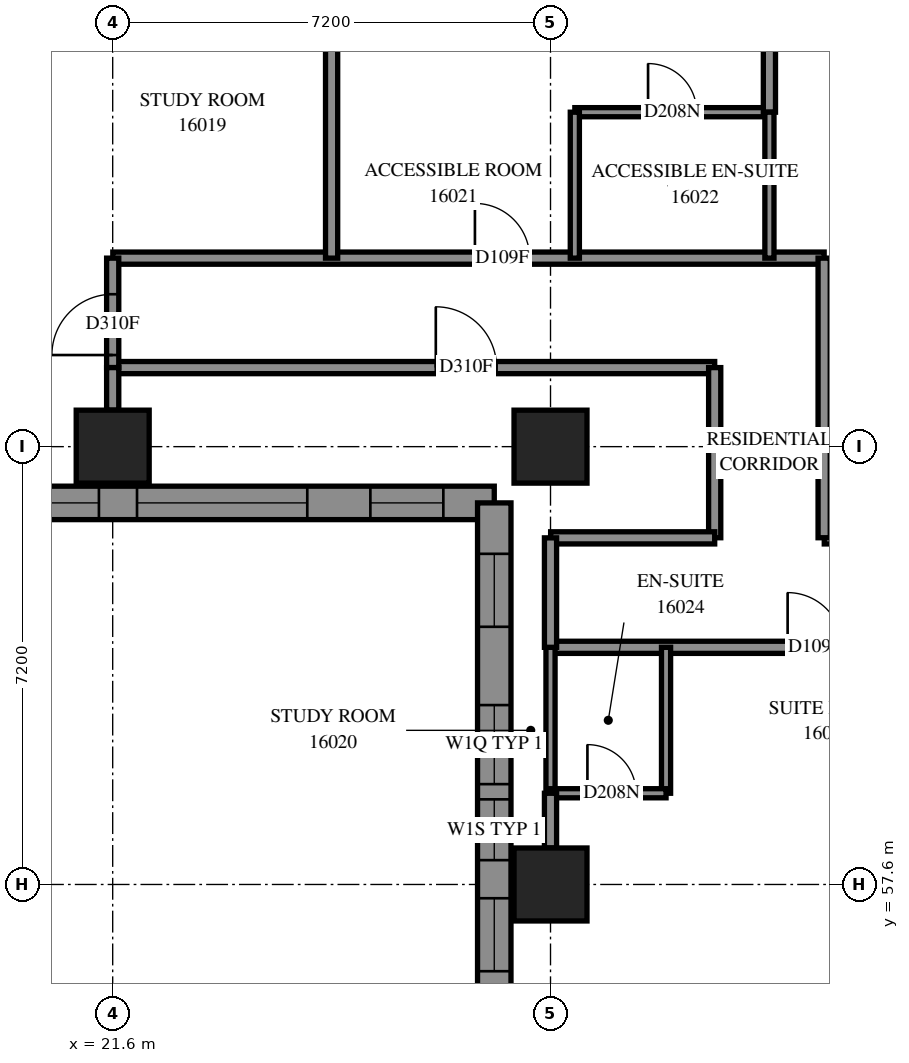
"""IFC4 building model, lengths in metres.
Left out: names, types, materials, properties, quantities, classifications, styles, units other than length and angle.
Written with IfcOpenShell. Run it as: python <this file> out.ifc"""

import sys

from ifc_helpers import new_model, si_unit, direction, frame, frame_2d, origin, origin_2d, place, context, subcontext, project, spatial, polyline, rectangle, outline, extrude, element, fill, save


model = new_model("IFC4")
c1 = context("Model", 3, precision=1e-05, world=origin(), true_north=direction((0.0, 1.0)))
c2 = subcontext(c1, "Body", "Model", "MODEL_VIEW")
j1 = project(units=[si_unit("LENGTHUNIT", "METRE"), si_unit("PLANEANGLEUNIT", "RADIAN")], contexts=[c1])
p1 = place(None, origin())
s1 = spatial("IfcSite", under=j1, at=p1, CompositionType="ELEMENT")
p2 = place(p1, origin())
s2 = spatial("IfcBuilding", under=s1, at=p2, CompositionType="ELEMENT")
p3 = place(p2, frame((0.0, 0.0, 61.0)))
s3 = spatial("IfcBuildingStorey", under=s2, at=p3, CompositionType="ELEMENT", Elevation=61.0)
for number, where, z_axis, x_axis in (
    (1, (21.6, 64.8, 0.0), (0.0, 0.0, 1.0), (1.0, 0.0, 0.0)),
    (2, (28.8, 57.6, 0.0), (0.0, 0.0, 1.0), (1.0, 0.0, 0.0)),
    (3, (28.8, 64.8, 0.0), (0.0, 0.0, 1.0), (1.0, 0.0, 0.0)),
):
    element("IfcColumn", number, at=place(p3, frame(where, z_axis=z_axis, x_axis=x_axis)), inside=s3, PredefinedType="COLUMN", context=c2, shape_type="SweptSolid", body=[
        extrude(rectangle(XDim=1.2, YDim=1.2, at=origin_2d()), origin(), (0.0, 0.0, 1.0), 3.1),
    ])
p4 = place(p3, frame((19.472, 63.875, 0.0), z_axis=(0.0, 0.0, 1.0), x_axis=(1.0, 0.0, 0.0)))
e4 = element("IfcWall", 4, at=p4, inside=s3, PredefinedType="SOLIDWALL", context=c2, shape_type="SweptSolid", body=[
    extrude(outline(polyline([(-0.275, -0.275), (8.128, -0.275), (8.678, 0.275), (0.275, 0.275), (-0.275, -0.275)])), origin(), (0.0, 0.0, 1.0), 3.1),
])
p5 = place(p4, frame((2.528, 0.0, 0.5)))
e5 = element("IfcOpeningElement", 5, at=p5, cuts=e4, PredefinedType="OPENING", context=c2, shape_type="SweptSolid", body=[
    extrude(rectangle(XDim=2.8, YDim=2.45, at=frame_2d((1.4, 1.225))), frame((0.0, 0.285, 0.0), z_axis=(0.0, -1.0, 0.0), x_axis=(1.0, 0.0, 0.0)), (0.0, 0.0, 1.0), 0.57),
])
p6 = place(p4, frame((0.702, 0.0, 0.5)))
e6 = element("IfcOpeningElement", 6, at=p6, cuts=e4, PredefinedType="OPENING", context=c2, shape_type="SweptSolid", body=[
    extrude(rectangle(XDim=1.2, YDim=2.45, at=frame_2d((0.6, 1.225))), frame((0.0, 0.285, 0.0), z_axis=(0.0, -1.0, 0.0), x_axis=(1.0, 0.0, 0.0)), (0.0, 0.0, 1.0), 0.57),
])
p7 = place(p4, frame((6.365, 0.0, 0.5)))
e7 = element("IfcOpeningElement", 7, at=p7, cuts=e4, PredefinedType="OPENING", context=c2, shape_type="SweptSolid", body=[
    extrude(rectangle(XDim=1.2, YDim=2.45, at=frame_2d((0.6, 1.225))), frame((0.0, 0.285, 0.0), z_axis=(0.0, -1.0, 0.0), x_axis=(1.0, 0.0, 0.0)), (0.0, 0.0, 1.0), 0.57),
])
p8 = place(p3, frame((27.875, 63.875, 0.0), z_axis=(0.0, 0.0, 1.0), x_axis=(0.0, -1.0, 0.0)))
e8 = element("IfcWall", 8, at=p8, inside=s3, PredefinedType="SOLIDWALL", context=c2, shape_type="SweptSolid", body=[
    extrude(outline(polyline([(0.275, -0.275), (8.678, -0.275), (8.128, 0.275), (-0.275, 0.275), (0.275, -0.275)])), origin(), (0.0, 0.0, 1.0), 3.1),
])
p9 = place(p8, frame((0.838, 0.0, 0.5)))
e9 = element("IfcOpeningElement", 9, at=p9, cuts=e8, PredefinedType="OPENING", context=c2, shape_type="SweptSolid", body=[
    extrude(rectangle(XDim=1.2, YDim=2.45, at=frame_2d((0.6, 1.225))), frame((0.0, 0.285, 0.0), z_axis=(0.0, -1.0, 0.0), x_axis=(1.0, 0.0, 0.0)), (0.0, 0.0, 1.0), 0.57),
])
p10 = place(p8, frame((6.502, 0.0, 0.5)))
e10 = element("IfcOpeningElement", 10, at=p10, cuts=e8, PredefinedType="OPENING", context=c2, shape_type="SweptSolid", body=[
    extrude(rectangle(XDim=1.2, YDim=2.45, at=frame_2d((0.6, 1.225))), frame((0.0, 0.285, 0.0), z_axis=(0.0, -1.0, 0.0), x_axis=(1.0, 0.0, 0.0)), (0.0, 0.0, 1.0), 0.57),
])
p11 = place(p8, frame((3.325, 0.0, 0.45)))
e11 = element("IfcOpeningElement", 11, at=p11, cuts=e8, PredefinedType="OPENING", context=c2, shape_type="SweptSolid", body=[
    extrude(rectangle(XDim=1.3, YDim=2.5, at=frame_2d((0.65, 1.25))), frame((0.0, 0.285, 0.0), z_axis=(0.0, -1.0, 0.0), x_axis=(1.0, 0.0, 0.0)), (0.0, 0.0, 1.0), 0.57),
])
p12 = place(p8, frame((4.875, 0.0, 0.45)))
e12 = element("IfcOpeningElement", 12, at=p12, cuts=e8, PredefinedType="OPENING", context=c2, shape_type="SweptSolid", body=[
    extrude(rectangle(XDim=1.0, YDim=2.5, at=frame_2d((0.5, 1.25))), frame((0.0, 0.285, 0.0), z_axis=(0.0, -1.0, 0.0), x_axis=(1.0, 0.0, 0.0)), (0.0, 0.0, 1.0), 0.57),
])
p13 = place(p3, frame((28.8, 61.5, 0.0), z_axis=(0.0, 0.0, 1.0), x_axis=(1.0, 0.0, 0.0)))
e13 = element("IfcWall", 13, at=p13, inside=s3, PredefinedType="PARTITIONING", context=c2, shape_type="SweptSolid", body=[
    extrude(rectangle(XDim=24.3, YDim=0.2, at=frame_2d((12.15, 0.0))), origin(), (0.0, 0.0, 1.0), 3.1),
])
p14 = place(p13, frame((3.899, 0.0, 0.0)))
e14 = element("IfcOpeningElement", 14, at=p14, cuts=e13, PredefinedType="OPENING", context=c2, shape_type="SweptSolid", body=[
    extrude(rectangle(XDim=0.9, YDim=2.1, at=frame_2d((0.45, 1.05))), frame((0.0, 0.11, 0.0), z_axis=(0.0, -1.0, 0.0), x_axis=(1.0, 0.0, 0.0)), (0.0, 0.0, 1.0), 0.22),
])
p15 = place(p13, frame((9.5, 0.0, 0.0)))
e15 = element("IfcOpeningElement", 15, at=p15, cuts=e13, PredefinedType="OPENING", context=c2, shape_type="SweptSolid", body=[
    extrude(rectangle(XDim=0.9, YDim=2.1, at=frame_2d((0.45, 1.05))), frame((0.0, 0.11, 0.0), z_axis=(0.0, -1.0, 0.0), x_axis=(1.0, 0.0, 0.0)), (0.0, 0.0, 1.0), 0.22),
])
p16 = place(p13, frame((11.307, 0.0, 0.0)))
e16 = element("IfcOpeningElement", 16, at=p16, cuts=e13, PredefinedType="OPENING", context=c2, shape_type="SweptSolid", body=[
    extrude(rectangle(XDim=1.0, YDim=2.1, at=frame_2d((0.5, 1.05))), frame((0.0, 0.11, 0.0), z_axis=(0.0, -1.0, 0.0), x_axis=(1.0, 0.0, 0.0)), (0.0, 0.0, 1.0), 0.22),
])
p17 = place(p13, frame((16.7, 0.0, 0.0)))
e17 = element("IfcOpeningElement", 17, at=p17, cuts=e13, PredefinedType="OPENING", context=c2, shape_type="SweptSolid", body=[
    extrude(rectangle(XDim=0.9, YDim=2.1, at=frame_2d((0.45, 1.05))), frame((0.0, 0.11, 0.0), z_axis=(0.0, -1.0, 0.0), x_axis=(1.0, 0.0, 0.0)), (0.0, 0.0, 1.0), 0.22),
])
p18 = place(p13, frame((18.508, 0.0, 0.0)))
e18 = element("IfcOpeningElement", 18, at=p18, cuts=e13, PredefinedType="OPENING", context=c2, shape_type="SweptSolid", body=[
    extrude(rectangle(XDim=1.0, YDim=2.1, at=frame_2d((0.5, 1.05))), frame((0.0, 0.11, 0.0), z_axis=(0.0, -1.0, 0.0), x_axis=(1.0, 0.0, 0.0)), (0.0, 0.0, 1.0), 0.22),
])
p19 = place(p13, frame((23.033, 0.0, 0.0)))
e19 = element("IfcOpeningElement", 19, at=p19, cuts=e13, PredefinedType="OPENING", context=c2, shape_type="SweptSolid", body=[
    extrude(rectangle(XDim=1.0, YDim=2.1, at=frame_2d((0.5, 1.05))), frame((0.0, 0.11, 0.0), z_axis=(0.0, -1.0, 0.0), x_axis=(1.0, 0.0, 0.0)), (0.0, 0.0, 1.0), 0.22),
])
p20 = place(p3, frame((33.302, 63.3, 0.0), z_axis=(0.0, 0.0, 1.0), x_axis=(1.0, 0.0, 0.0)))
e20 = element("IfcWall", 20, at=p20, inside=s3, PredefinedType="PARTITIONING", context=c2, shape_type="SweptSolid", body=[
    extrude(rectangle(XDim=21.798, YDim=0.2, at=frame_2d((10.899, 0.0))), origin(), (0.0, 0.0, 1.0), 3.1),
])
p21 = place(p20, frame((1.091, 0.0, 0.0)))
e21 = element("IfcOpeningElement", 21, at=p21, cuts=e20, PredefinedType="OPENING", context=c2, shape_type="SweptSolid", body=[
    extrude(rectangle(XDim=0.9, YDim=2.1, at=frame_2d((0.45, 1.05))), frame((0.0, 0.11, 0.0), z_axis=(0.0, -1.0, 0.0), x_axis=(1.0, 0.0, 0.0)), (0.0, 0.0, 1.0), 0.22),
])
p22 = place(p20, frame((8.248, 0.0, 0.0)))
e22 = element("IfcOpeningElement", 22, at=p22, cuts=e20, PredefinedType="OPENING", context=c2, shape_type="SweptSolid", body=[
    extrude(rectangle(XDim=0.9, YDim=2.1, at=frame_2d((0.45, 1.05))), frame((0.0, 0.11, 0.0), z_axis=(0.0, -1.0, 0.0), x_axis=(1.0, 0.0, 0.0)), (0.0, 0.0, 1.0), 0.22),
])
p23 = place(p20, frame((15.448, 0.0, 0.0)))
e23 = element("IfcOpeningElement", 23, at=p23, cuts=e20, PredefinedType="OPENING", context=c2, shape_type="SweptSolid", body=[
    extrude(rectangle(XDim=0.9, YDim=2.1, at=frame_2d((0.45, 1.05))), frame((0.0, 0.11, 0.0), z_axis=(0.0, -1.0, 0.0), x_axis=(1.0, 0.0, 0.0)), (0.0, 0.0, 1.0), 0.22),
])
p24 = place(p3, frame((21.602, 67.9, 0.0), z_axis=(0.0, 0.0, 1.0), x_axis=(1.0, 0.0, 0.0)))
e24 = element("IfcWall", 24, at=p24, inside=s3, PredefinedType="PARTITIONING", context=c2, shape_type="SweptSolid", body=[
    extrude(rectangle(XDim=11.698, YDim=0.2, at=frame_2d((5.849, 0.0))), origin(), (0.0, 0.0, 1.0), 3.1),
])
p25 = place(p24, frame((5.955, 0.0, 0.0)))
e25 = element("IfcOpeningElement", 25, at=p25, cuts=e24, PredefinedType="OPENING", context=c2, shape_type="SweptSolid", body=[
    extrude(rectangle(XDim=0.9, YDim=2.1, at=frame_2d((0.45, 1.05))), frame((0.0, 0.11, 0.0), z_axis=(0.0, -1.0, 0.0), x_axis=(1.0, 0.0, 0.0)), (0.0, 0.0, 1.0), 0.22),
])
p26 = place(p3, frame((21.6, 66.1, 0.0), z_axis=(0.0, 0.0, 1.0), x_axis=(1.0, 0.0, 0.0)))
e26 = element("IfcWall", 26, at=p26, inside=s3, PredefinedType="PARTITIONING", context=c2, shape_type="SweptSolid", body=[
    extrude(rectangle(XDim=9.9, YDim=0.2, at=frame_2d((4.95, 0.0))), origin(), (0.0, 0.0, 1.0), 3.1),
])
p27 = place(p26, frame((5.314, 0.0, 0.0)))
e27 = element("IfcOpeningElement", 27, at=p27, cuts=e26, PredefinedType="OPENING", context=c2, shape_type="SweptSolid", body=[
    extrude(rectangle(XDim=1.0, YDim=2.1, at=frame_2d((0.5, 1.05))), frame((0.0, 0.11, 0.0), z_axis=(0.0, -1.0, 0.0), x_axis=(1.0, 0.0, 0.0)), (0.0, 0.0, 1.0), 0.22),
])
p28 = place(p3, frame((25.2, 67.9, 0.0), z_axis=(0.0, 0.0, 1.0), x_axis=(0.0, 1.0, 0.0)))
e28 = element("IfcWall", 28, at=p28, inside=s3, PredefinedType="PARTITIONING", context=c2, shape_type="SweptSolid", body=[
    extrude(rectangle(XDim=5.09, YDim=0.2, at=frame_2d((2.545, 0.0))), origin(), (0.0, 0.0, 1.0), 3.1),
])
p29 = place(p3, frame((33.3, 63.302, 0.0), z_axis=(0.0, 0.0, 1.0), x_axis=(0.0, 1.0, 0.0)))
e29 = element("IfcWall", 29, at=p29, inside=s3, PredefinedType="PARTITIONING", context=c2, shape_type="SweptSolid", body=[
    extrude(rectangle(XDim=4.598, YDim=0.2, at=frame_2d((2.299, 0.0))), origin(), (0.0, 0.0, 1.0), 3.1),
])
p30 = place(p3, frame((29.2, 70.3, 0.0), z_axis=(0.0, 0.0, 1.0), x_axis=(1.0, 0.0, 0.0)))
e30 = element("IfcWall", 30, at=p30, inside=s3, PredefinedType="PARTITIONING", context=c2, shape_type="SweptSolid", body=[
    extrude(rectangle(XDim=3.2, YDim=0.15, at=frame_2d((1.6, 0.0))), origin(), (0.0, 0.0, 1.0), 3.1),
])
p31 = place(p30, frame((1.204, 0.0, 0.0)))
e31 = element("IfcOpeningElement", 31, at=p31, cuts=e30, PredefinedType="OPENING", context=c2, shape_type="SweptSolid", body=[
    extrude(rectangle(XDim=0.8, YDim=2.1, at=frame_2d((0.4, 1.05))), frame((0.0, 0.085, 0.0), z_axis=(0.0, -1.0, 0.0), x_axis=(1.0, 0.0, 0.0)), (0.0, 0.0, 1.0), 0.17),
])
p32 = place(p3, frame((31.5, 63.302, 0.0), z_axis=(0.0, 0.0, 1.0), x_axis=(0.0, 1.0, 0.0)))
e32 = element("IfcWall", 32, at=p32, inside=s3, PredefinedType="PARTITIONING", context=c2, shape_type="SweptSolid", body=[
    extrude(rectangle(XDim=2.798, YDim=0.2, at=frame_2d((1.399, 0.0))), origin(), (0.0, 0.0, 1.0), 3.1),
])
p33 = place(p3, frame((28.802, 63.3, 0.0), z_axis=(0.0, 0.0, 1.0), x_axis=(1.0, 0.0, 0.0)))
e33 = element("IfcWall", 33, at=p33, inside=s3, PredefinedType="PARTITIONING", context=c2, shape_type="SweptSolid", body=[
    extrude(rectangle(XDim=2.698, YDim=0.2, at=frame_2d((1.349, 0.0))), origin(), (0.0, 0.0, 1.0), 3.1),
])
p34 = place(p3, frame((32.4, 70.3, 0.0), z_axis=(0.0, 0.0, 1.0), x_axis=(0.0, 1.0, 0.0)))
e34 = element("IfcWall", 34, at=p34, inside=s3, PredefinedType="PARTITIONING", context=c2, shape_type="SweptSolid", body=[
    extrude(rectangle(XDim=2.623, YDim=0.2, at=frame_2d((1.311, 0.0))), origin(), (0.0, 0.0, 1.0), 3.1),
])
p35 = place(p3, frame((30.7, 59.1, 0.0), z_axis=(0.0, 0.0, 1.0), x_axis=(0.0, 1.0, 0.0)))
e35 = element("IfcWall", 35, at=p35, inside=s3, PredefinedType="PARTITIONING", context=c2, shape_type="SweptSolid", body=[
    extrude(rectangle(XDim=2.4, YDim=0.15, at=frame_2d((1.2, 0.0))), origin(), (0.0, 0.0, 1.0), 3.1),
])
p36 = place(p3, frame((28.8, 59.1, 0.0), z_axis=(0.0, 0.0, 1.0), x_axis=(0.0, 1.0, 0.0)))
e36 = element("IfcWall", 36, at=p36, inside=s3, PredefinedType="PARTITIONING", context=c2, shape_type="SweptSolid", body=[
    extrude(rectangle(XDim=2.4, YDim=0.15, at=frame_2d((1.2, 0.0))), origin(), (0.0, 0.0, 1.0), 2.6),
])
for number, where, z_axis, x_axis in (
    (37, (29.2, 67.9, 0.0), (0.0, 0.0, 1.0), (0.0, 1.0, 0.0)),
    (38, (32.4, 67.9, 0.0), (0.0, 0.0, 1.0), (0.0, 1.0, 0.0)),
):
    element("IfcWall", number, at=place(p3, frame(where, z_axis=z_axis, x_axis=x_axis)), inside=s3, PredefinedType="PARTITIONING", context=c2, shape_type="SweptSolid", body=[
        extrude(rectangle(XDim=2.4, YDim=0.15, at=frame_2d((1.2, 0.0))), origin(), (0.0, 0.0, 1.0), 3.1),
    ])
p37 = place(p3, frame((28.8, 59.1, 0.0), z_axis=(0.0, 0.0, 1.0), x_axis=(1.0, 0.0, 0.0)))
e39 = element("IfcWall", 39, at=p37, inside=s3, PredefinedType="PARTITIONING", context=c2, shape_type="SweptSolid", body=[
    extrude(rectangle(XDim=1.9, YDim=0.15, at=frame_2d((0.95, 0.0))), origin(), (0.0, 0.0, 1.0), 3.1),
])
p38 = place(p37, frame((0.607, 0.0, 0.0)))
e40 = element("IfcOpeningElement", 40, at=p38, cuts=e39, PredefinedType="OPENING", context=c2, shape_type="SweptSolid", body=[
    extrude(rectangle(XDim=0.8, YDim=2.1, at=frame_2d((0.4, 1.05))), frame((0.0, 0.085, 0.0), z_axis=(0.0, -1.0, 0.0), x_axis=(1.0, 0.0, 0.0)), (0.0, 0.0, 1.0), 0.17),
])
p39 = place(p3, frame((21.6, 66.1, 0.0), z_axis=(0.0, 0.0, 1.0), x_axis=(0.0, 1.0, 0.0)))
e41 = element("IfcWall", 41, at=p39, inside=s3, PredefinedType="PARTITIONING", context=c2, shape_type="SweptSolid", body=[
    extrude(rectangle(XDim=1.8, YDim=0.2, at=frame_2d((0.9, 0.0))), origin(), (0.0, 0.0, 1.0), 2.6),
])
p40 = place(p39, frame((0.207, 0.0, 0.0)))
e42 = element("IfcOpeningElement", 42, at=p40, cuts=e41, PredefinedType="OPENING", context=c2, shape_type="SweptSolid", body=[
    extrude(rectangle(XDim=1.0, YDim=2.1, at=frame_2d((0.5, 1.05))), frame((0.0, 0.11, 0.0), z_axis=(0.0, -1.0, 0.0), x_axis=(1.0, 0.0, 0.0)), (0.0, 0.0, 1.0), 0.22),
])
p41 = place(p3, frame((28.8, 61.5, 0.0), z_axis=(0.0, 0.0, 1.0), x_axis=(0.0, 1.0, 0.0)))
e43 = element("IfcWall", 43, at=p41, inside=s3, PredefinedType="PARTITIONING", context=c2, shape_type="SweptSolid", body=[
    extrude(rectangle(XDim=1.8, YDim=0.2, at=frame_2d((0.9, 0.0))), origin(), (0.0, 0.0, 1.0), 2.6),
])
p42 = place(p3, frame((28.8, 58.2, 0.0), z_axis=(0.0, 0.0, 1.0), x_axis=(0.0, 1.0, 0.0)))
e44 = element("IfcWall", 44, at=p42, inside=s3, PredefinedType="PARTITIONING", context=c2, shape_type="SweptSolid", body=[
    extrude(rectangle(XDim=0.9, YDim=0.2, at=frame_2d((0.45, 0.0))), origin(), (0.0, 0.0, 1.0), 2.6),
])
p43 = place(p3, frame((21.6, 65.4, 0.0), z_axis=(0.0, 0.0, 1.0), x_axis=(0.0, 1.0, 0.0)))
e45 = element("IfcWall", 45, at=p43, inside=s3, PredefinedType="PARTITIONING", context=c2, shape_type="SweptSolid", body=[
    extrude(rectangle(XDim=0.7, YDim=0.2, at=frame_2d((0.35, 0.0))), origin(), (0.0, 0.0, 1.0), 2.6),
])
p44 = place(p5, origin())
e46 = element("IfcWindow", 46, at=p44, inside=s3, PartitioningType="SINGLE_PANEL", PredefinedType="WINDOW", context=c2, shape_type="SweptSolid", body=[
    extrude(rectangle(XDim=2.8, YDim=2.45, at=frame_2d((1.4, 1.225))), frame((0.0, 0.155, 0.0), z_axis=(0.0, -1.0, 0.0), x_axis=(1.0, 0.0, 0.0)), (0.0, 0.0, 1.0), 0.06),
])
fill(e5, e46)
p45 = place(p6, origin())
e47 = element("IfcWindow", 47, at=p45, inside=s3, PartitioningType="SINGLE_PANEL", PredefinedType="WINDOW", context=c2, shape_type="SweptSolid", body=[
    extrude(rectangle(XDim=1.2, YDim=2.45, at=frame_2d((0.6, 1.225))), frame((0.0, 0.155, 0.0), z_axis=(0.0, -1.0, 0.0), x_axis=(1.0, 0.0, 0.0)), (0.0, 0.0, 1.0), 0.06),
])
fill(e6, e47)
p46 = place(p7, origin())
e48 = element("IfcWindow", 48, at=p46, inside=s3, PartitioningType="SINGLE_PANEL", PredefinedType="WINDOW", context=c2, shape_type="SweptSolid", body=[
    extrude(rectangle(XDim=1.2, YDim=2.45, at=frame_2d((0.6, 1.225))), frame((0.0, 0.155, 0.0), z_axis=(0.0, -1.0, 0.0), x_axis=(1.0, 0.0, 0.0)), (0.0, 0.0, 1.0), 0.06),
])
fill(e7, e48)
p47 = place(p9, origin())
e49 = element("IfcWindow", 49, at=p47, inside=s3, PartitioningType="SINGLE_PANEL", PredefinedType="WINDOW", context=c2, shape_type="SweptSolid", body=[
    extrude(rectangle(XDim=1.2, YDim=2.45, at=frame_2d((0.6, 1.225))), frame((0.0, 0.155, 0.0), z_axis=(0.0, -1.0, 0.0), x_axis=(1.0, 0.0, 0.0)), (0.0, 0.0, 1.0), 0.06),
])
fill(e9, e49)
p48 = place(p10, origin())
e50 = element("IfcWindow", 50, at=p48, inside=s3, PartitioningType="SINGLE_PANEL", PredefinedType="WINDOW", context=c2, shape_type="SweptSolid", body=[
    extrude(rectangle(XDim=1.2, YDim=2.45, at=frame_2d((0.6, 1.225))), frame((0.0, 0.155, 0.0), z_axis=(0.0, -1.0, 0.0), x_axis=(1.0, 0.0, 0.0)), (0.0, 0.0, 1.0), 0.06),
])
fill(e10, e50)
p49 = place(p40, origin())
e51 = element("IfcDoor", 51, at=p49, inside=s3, OperationType="SINGLE_SWING_RIGHT", PredefinedType="DOOR", context=c2, shape_type="SweptSolid", body=[
    extrude(rectangle(XDim=1.0, YDim=2.1, at=frame_2d((0.5, 1.05))), frame((0.0, 0.025, 0.0), z_axis=(0.0, -1.0, 0.0), x_axis=(1.0, 0.0, 0.0)), (0.0, 0.0, 1.0), 0.05),
])
fill(e42, e51)
p50 = place(p27, origin())
e52 = element("IfcDoor", 52, at=p50, inside=s3, OperationType="SINGLE_SWING_LEFT", PredefinedType="DOOR", context=c2, shape_type="SweptSolid", body=[
    extrude(rectangle(XDim=1.0, YDim=2.1, at=frame_2d((0.5, 1.05))), frame((0.0, 0.025, 0.0), z_axis=(0.0, -1.0, 0.0), x_axis=(1.0, 0.0, 0.0)), (0.0, 0.0, 1.0), 0.05),
])
fill(e27, e52)
p51 = place(p25, origin())
e53 = element("IfcDoor", 53, at=p51, inside=s3, OperationType="SINGLE_SWING_LEFT", PredefinedType="DOOR", context=c2, shape_type="SweptSolid", body=[
    extrude(rectangle(XDim=0.9, YDim=2.1, at=frame_2d((0.45, 1.05))), frame((0.0, 0.025, 0.0), z_axis=(0.0, -1.0, 0.0), x_axis=(1.0, 0.0, 0.0)), (0.0, 0.0, 1.0), 0.05),
])
fill(e25, e53)
p52 = place(p31, origin())
e54 = element("IfcDoor", 54, at=p52, inside=s3, OperationType="SINGLE_SWING_RIGHT", PredefinedType="DOOR", context=c2, shape_type="SweptSolid", body=[
    extrude(rectangle(XDim=0.8, YDim=2.1, at=frame_2d((0.4, 1.05))), frame((0.0, 0.025, 0.0), z_axis=(0.0, -1.0, 0.0), x_axis=(1.0, 0.0, 0.0)), (0.0, 0.0, 1.0), 0.05),
])
fill(e31, e54)
p53 = place(p14, origin())
e55 = element("IfcDoor", 55, at=p53, inside=s3, OperationType="SINGLE_SWING_LEFT", PredefinedType="DOOR", context=c2, shape_type="SweptSolid", body=[
    extrude(rectangle(XDim=0.9, YDim=2.1, at=frame_2d((0.45, 1.05))), frame((0.0, 0.025, 0.0), z_axis=(0.0, -1.0, 0.0), x_axis=(1.0, 0.0, 0.0)), (0.0, 0.0, 1.0), 0.05),
])
fill(e14, e55)
p54 = place(p38, origin())
e56 = element("IfcDoor", 56, at=p54, inside=s3, OperationType="SINGLE_SWING_RIGHT", PredefinedType="DOOR", context=c2, shape_type="SweptSolid", body=[
    extrude(rectangle(XDim=0.8, YDim=2.1, at=frame_2d((0.4, 1.05))), frame((0.0, 0.025, 0.0), z_axis=(0.0, -1.0, 0.0), x_axis=(1.0, 0.0, 0.0)), (0.0, 0.0, 1.0), 0.05),
])
fill(e40, e56)
p55 = place(p11, origin())
e57 = element("IfcWindow", 57, at=p55, inside=s3, PartitioningType="SINGLE_PANEL", PredefinedType="WINDOW", context=c2, shape_type="SweptSolid", body=[
    extrude(rectangle(XDim=1.3, YDim=2.5, at=frame_2d((0.65, 1.25))), frame((0.0, 0.155, 0.0), z_axis=(0.0, -1.0, 0.0), x_axis=(1.0, 0.0, 0.0)), (0.0, 0.0, 1.0), 0.06),
])
fill(e11, e57)
p56 = place(p12, origin())
e58 = element("IfcWindow", 58, at=p56, inside=s3, PartitioningType="SINGLE_PANEL", PredefinedType="WINDOW", context=c2, shape_type="SweptSolid", body=[
    extrude(rectangle(XDim=1.0, YDim=2.5, at=frame_2d((0.5, 1.25))), frame((0.0, 0.155, 0.0), z_axis=(0.0, -1.0, 0.0), x_axis=(1.0, 0.0, 0.0)), (0.0, 0.0, 1.0), 0.06),
])
fill(e12, e58)
save(model, sys.argv[1])
